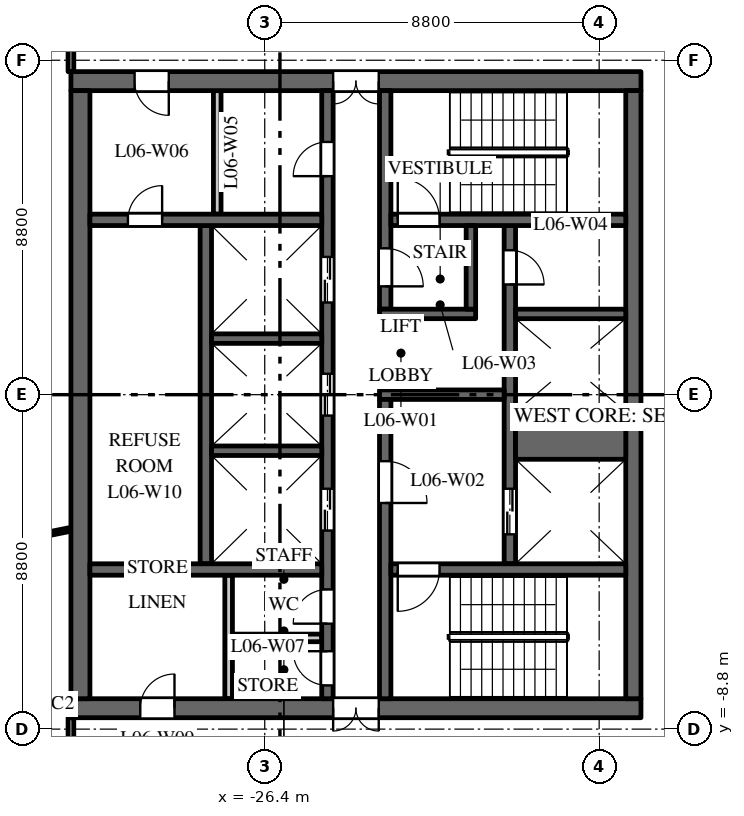
"""IFC4 building model, lengths in metres.
Left out: names, types, materials, properties, quantities, classifications, styles, units other than length and angle.
Written with IfcOpenShell. Run it as: python <this file> out.ifc"""

import sys

from ifc_helpers import new_model, si_unit, direction, frame, frame_2d, origin, place, context, subcontext, project, spatial, rectangle, extrude, element, fill, save


model = new_model("IFC4")
c1 = context("Model", 3, precision=1e-05, world=origin(), true_north=direction((0.0, 1.0)))
c2 = subcontext(c1, "Body", "Model", "MODEL_VIEW")
j1 = project(units=[si_unit("LENGTHUNIT", "METRE"), si_unit("PLANEANGLEUNIT", "RADIAN")], contexts=[c1])
p1 = place(None, origin())
s1 = spatial("IfcSite", under=j1, at=p1, CompositionType="ELEMENT")
p2 = place(p1, origin())
s2 = spatial("IfcBuilding", under=s1, at=p2, CompositionType="ELEMENT")
p3 = place(p2, frame((0.0, 0.0, 34.5)))
s3 = spatial("IfcBuildingStorey", under=s2, at=p3, CompositionType="ELEMENT", Elevation=34.5)
p4 = place(p3, frame((-16.5, 8.25, 0.0), z_axis=(0.0, 0.0, 1.0), x_axis=(-1.0, 0.0, 0.0)))
e1 = element("IfcWall", 1, at=p4, inside=s3, PredefinedType="SHEAR", context=c2, shape_type="SweptSolid", body=[
    extrude(rectangle(XDim=15.0, YDim=0.5, at=frame_2d((7.5, 0.0))), origin(), (0.0, 0.0, 1.0), 3.7),
])
p5 = place(p4, frame((6.9, 0.0, 0.0)))
e2 = element("IfcOpeningElement", 2, at=p5, cuts=e1, PredefinedType="OPENING", context=c2, shape_type="SweptSolid", body=[
    extrude(rectangle(XDim=1.2, YDim=2.1, at=frame_2d((0.6, 1.05))), frame((0.0, 0.26, 0.0), z_axis=(0.0, -1.0, 0.0), x_axis=(1.0, 0.0, 0.0)), (0.0, 0.0, 1.0), 0.52),
])
p6 = place(p4, frame((12.425, 0.0, 0.0)))
e3 = element("IfcOpeningElement", 3, at=p6, cuts=e1, PredefinedType="OPENING", context=c2, shape_type="SweptSolid", body=[
    extrude(rectangle(XDim=0.9, YDim=2.1, at=frame_2d((0.45, 1.05))), frame((0.0, 0.26, 0.0), z_axis=(0.0, -1.0, 0.0), x_axis=(1.0, 0.0, 0.0)), (0.0, 0.0, 1.0), 0.52),
])
p7 = place(p3, frame((-16.5, -8.25, 0.0), z_axis=(0.0, 0.0, 1.0), x_axis=(-1.0, 0.0, 0.0)))
e4 = element("IfcWall", 4, at=p7, inside=s3, PredefinedType="SHEAR", context=c2, shape_type="SweptSolid", body=[
    extrude(rectangle(XDim=15.0, YDim=0.5, at=frame_2d((7.5, 0.0))), origin(), (0.0, 0.0, 1.0), 3.7),
])
p8 = place(p7, frame((6.9, 0.0, 0.0)))
e5 = element("IfcOpeningElement", 5, at=p8, cuts=e4, PredefinedType="OPENING", context=c2, shape_type="SweptSolid", body=[
    extrude(rectangle(XDim=1.2, YDim=2.1, at=frame_2d((0.6, 1.05))), frame((0.0, 0.26, 0.0), z_axis=(0.0, -1.0, 0.0), x_axis=(1.0, 0.0, 0.0)), (0.0, 0.0, 1.0), 0.52),
])
p9 = place(p7, frame((12.275, 0.0, 0.0)))
e6 = element("IfcOpeningElement", 6, at=p9, cuts=e4, PredefinedType="OPENING", context=c2, shape_type="SweptSolid", body=[
    extrude(rectangle(XDim=0.9, YDim=2.1, at=frame_2d((0.45, 1.05))), frame((0.0, 0.26, 0.0), z_axis=(0.0, -1.0, 0.0), x_axis=(1.0, 0.0, 0.0)), (0.0, 0.0, 1.0), 0.52),
])
p10 = place(p3, frame((-27.95, -4.45, 0.0), z_axis=(0.0, 0.0, 1.0), x_axis=(0.0, 1.0, 0.0)))
e7 = element("IfcWall", 7, at=p10, inside=s3, PredefinedType="SHEAR", context=c2, shape_type="SweptSolid", body=[
    extrude(rectangle(XDim=8.9, YDim=0.3, at=frame_2d((4.45, 0.0))), origin(), (0.0, 0.0, 1.0), 3.7),
])
p11 = place(p3, frame((-19.95, -4.45, 0.0), z_axis=(0.0, 0.0, 1.0), x_axis=(0.0, 1.0, 0.0)))
e8 = element("IfcWall", 8, at=p11, inside=s3, PredefinedType="SHEAR", context=c2, shape_type="SweptSolid", body=[
    extrude(rectangle(XDim=8.9, YDim=0.3, at=frame_2d((4.45, 0.0))), origin(), (0.0, 0.0, 1.0), 3.7),
])
p12 = place(p11, frame((0.775, 0.0, 0.0)))
e9 = element("IfcOpeningElement", 9, at=p12, cuts=e8, PredefinedType="OPENING", context=c2, shape_type="SweptSolid", body=[
    extrude(rectangle(XDim=1.2, YDim=2.1, at=frame_2d((0.6, 1.05))), frame((0.0, 0.16, 0.0), z_axis=(0.0, -1.0, 0.0), x_axis=(1.0, 0.0, 0.0)), (0.0, 0.0, 1.0), 0.32),
])
p13 = place(p11, frame((7.35, 0.0, 0.0)))
e10 = element("IfcOpeningElement", 10, at=p13, cuts=e8, PredefinedType="OPENING", context=c2, shape_type="SweptSolid", body=[
    extrude(rectangle(XDim=0.9, YDim=2.1, at=frame_2d((0.45, 1.05))), frame((0.0, 0.16, 0.0), z_axis=(0.0, -1.0, 0.0), x_axis=(1.0, 0.0, 0.0)), (0.0, 0.0, 1.0), 0.32),
])
p14 = place(p3, frame((-24.75, -8.0, 0.0), z_axis=(0.0, 0.0, 1.0), x_axis=(0.0, 1.0, 0.0)))
e11 = element("IfcWall", 11, at=p14, inside=s3, PredefinedType="SHEAR", context=c2, shape_type="SweptSolid", body=[
    extrude(rectangle(XDim=16.0, YDim=0.3, at=frame_2d((8.0, 0.0))), origin(), (0.0, 0.0, 1.0), 3.7),
])
p15 = place(p14, frame((4.425, 0.0, 0.0)))
e12 = element("IfcOpeningElement", 12, at=p15, cuts=e11, PredefinedType="OPENING", context=c2, shape_type="SweptSolid", body=[
    extrude(rectangle(XDim=1.1, YDim=2.1, at=frame_2d((0.55, 1.05))), frame((0.0, 0.16, 0.0), z_axis=(0.0, -1.0, 0.0), x_axis=(1.0, 0.0, 0.0)), (0.0, 0.0, 1.0), 0.32),
])
p16 = place(p14, frame((7.45, 0.0, 0.0)))
e13 = element("IfcOpeningElement", 13, at=p16, cuts=e11, PredefinedType="OPENING", context=c2, shape_type="SweptSolid", body=[
    extrude(rectangle(XDim=1.1, YDim=2.1, at=frame_2d((0.55, 1.05))), frame((0.0, 0.16, 0.0), z_axis=(0.0, -1.0, 0.0), x_axis=(1.0, 0.0, 0.0)), (0.0, 0.0, 1.0), 0.32),
])
p17 = place(p14, frame((10.425, 0.0, 0.0)))
e14 = element("IfcOpeningElement", 14, at=p17, cuts=e11, PredefinedType="OPENING", context=c2, shape_type="SweptSolid", body=[
    extrude(rectangle(XDim=1.2, YDim=2.1, at=frame_2d((0.6, 1.05))), frame((0.0, 0.16, 0.0), z_axis=(0.0, -1.0, 0.0), x_axis=(1.0, 0.0, 0.0)), (0.0, 0.0, 1.0), 0.32),
])
p18 = place(p14, frame((13.75, 0.0, 0.0)))
e15 = element("IfcOpeningElement", 15, at=p18, cuts=e11, PredefinedType="OPENING", context=c2, shape_type="SweptSolid", body=[
    extrude(rectangle(XDim=0.9, YDim=2.1, at=frame_2d((0.45, 1.05))), frame((0.0, 0.16, 0.0), z_axis=(0.0, -1.0, 0.0), x_axis=(1.0, 0.0, 0.0)), (0.0, 0.0, 1.0), 0.32),
])
p19 = place(p14, frame((1.975, 0.0, 0.0)))
e16 = element("IfcOpeningElement", 16, at=p19, cuts=e11, PredefinedType="OPENING", context=c2, shape_type="SweptSolid", body=[
    extrude(rectangle(XDim=0.9, YDim=2.1, at=frame_2d((0.45, 1.05))), frame((0.0, 0.16, 0.0), z_axis=(0.0, -1.0, 0.0), x_axis=(1.0, 0.0, 0.0)), (0.0, 0.0, 1.0), 0.32),
])
p20 = place(p14, frame((0.35, 0.0, 0.0)))
e17 = element("IfcOpeningElement", 17, at=p20, cuts=e11, PredefinedType="OPENING", context=c2, shape_type="SweptSolid", body=[
    extrude(rectangle(XDim=0.9, YDim=2.1, at=frame_2d((0.45, 1.05))), frame((0.0, 0.16, 0.0), z_axis=(0.0, -1.0, 0.0), x_axis=(1.0, 0.0, 0.0)), (0.0, 0.0, 1.0), 0.32),
])
p21 = place(p3, frame((-20.1, 0.0, 0.0), z_axis=(0.0, 0.0, 1.0), x_axis=(-1.0, 0.0, 0.0)))
e18 = element("IfcWall", 18, at=p21, inside=s3, PredefinedType="SHEAR", context=c2, shape_type="SweptSolid", body=[
    extrude(rectangle(XDim=3.28, YDim=0.25, at=frame_2d((1.64, 0.0))), origin(), (0.0, 0.0, 1.0), 3.7),
])
p22 = place(p3, frame((-16.7, -8.0, 0.0), z_axis=(0.0, 0.0, 1.0), x_axis=(0.0, 1.0, 0.0)))
e19 = element("IfcWall", 19, at=p22, inside=s3, PredefinedType="SHEAR", context=c2, shape_type="SweptSolid", body=[
    extrude(rectangle(XDim=16.0, YDim=0.4, at=frame_2d((8.0, 0.0))), origin(), (0.0, 0.0, 1.0), 3.7),
])
p23 = place(p3, frame((-31.25, -8.0, 0.0), z_axis=(0.0, 0.0, 1.0), x_axis=(0.0, 1.0, 0.0)))
e20 = element("IfcWall", 20, at=p23, inside=s3, PredefinedType="SHEAR", context=c2, shape_type="SweptSolid", body=[
    extrude(rectangle(XDim=16.0, YDim=0.5, at=frame_2d((8.0, 0.0))), origin(), (0.0, 0.0, 1.0), 3.7),
])
p24 = place(p3, frame((-24.9, 4.6, 0.0), z_axis=(0.0, 0.0, 1.0), x_axis=(-1.0, 0.0, 0.0)))
e21 = element("IfcWall", 21, at=p24, inside=s3, PredefinedType="SHEAR", context=c2, shape_type="SweptSolid", body=[
    extrude(rectangle(XDim=6.1, YDim=0.3, at=frame_2d((3.05, 0.0))), origin(), (0.0, 0.0, 1.0), 3.7),
])
p25 = place(p24, frame((4.2, 0.0, 0.0)))
e22 = element("IfcOpeningElement", 22, at=p25, cuts=e21, PredefinedType="OPENING", context=c2, shape_type="SweptSolid", body=[
    extrude(rectangle(XDim=0.9, YDim=2.1, at=frame_2d((0.45, 1.05))), frame((0.0, 0.16, 0.0), z_axis=(0.0, -1.0, 0.0), x_axis=(1.0, 0.0, 0.0)), (0.0, 0.0, 1.0), 0.32),
])
for number, where, z_axis, x_axis in (
    (23, (-27.65, 4.75, 0.0), (0.0, 0.0, 1.0), (0.0, 1.0, 0.0)),
    (24, (-27.35, -8.0, 0.0), (0.0, 0.0, 1.0), (0.0, 1.0, 0.0)),
):
    element("IfcWall", number, at=place(p3, frame(where, z_axis=z_axis, x_axis=x_axis)), inside=s3, PredefinedType="PARTITIONING", context=c2, shape_type="SweptSolid", body=[
        extrude(rectangle(XDim=3.25, YDim=0.2, at=frame_2d((1.625, 0.0))), origin(), (0.0, 0.0, 1.0), 3.7),
    ])
p26 = place(p3, frame((-24.9, -6.4, 0.0), z_axis=(0.0, 0.0, 1.0), x_axis=(-1.0, 0.0, 0.0)))
e25 = element("IfcWall", 25, at=p26, inside=s3, PredefinedType="PARTITIONING", context=c2, shape_type="SweptSolid", body=[
    extrude(rectangle(XDim=2.35, YDim=0.2, at=frame_2d((1.175, 0.0))), origin(), (0.0, 0.0, 1.0), 3.7),
])
p27 = place(p3, frame((-24.9, -4.6, 0.0), z_axis=(0.0, 0.0, 1.0), x_axis=(-1.0, 0.0, 0.0)))
e26 = element("IfcWall", 26, at=p27, inside=s3, PredefinedType="SHEAR", context=c2, shape_type="SweptSolid", body=[
    extrude(rectangle(XDim=6.1, YDim=0.3, at=frame_2d((3.05, 0.0))), origin(), (0.0, 0.0, 1.0), 3.7),
])
p28 = place(p3, frame((-16.9, -1.075, 0.0), z_axis=(0.0, 0.0, 1.0), x_axis=(-1.0, 0.0, 0.0)))
e27 = element("IfcWall", 27, at=p28, inside=s3, PredefinedType="SHEAR", context=c2, shape_type="SweptSolid", body=[
    extrude(rectangle(XDim=2.9, YDim=1.25, at=frame_2d((1.45, 0.0))), origin(), (0.0, 0.0, 1.0), 3.7),
])
for number, where, z_axis, x_axis in (
    (28, (-16.9, 2.125, 0.0), (0.0, 0.0, 1.0), (-1.0, 0.0, 0.0)),
    (29, (-24.9, -1.475, 0.0), (0.0, 0.0, 1.0), (-1.0, 0.0, 0.0)),
    (30, (-24.9, 1.475, 0.0), (0.0, 0.0, 1.0), (-1.0, 0.0, 0.0)),
):
    element("IfcWall", number, at=place(p3, frame(where, z_axis=z_axis, x_axis=x_axis)), inside=s3, PredefinedType="SHEAR", context=c2, shape_type="SweptSolid", body=[
        extrude(rectangle(XDim=2.9, YDim=0.25, at=frame_2d((1.45, 0.0))), origin(), (0.0, 0.0, 1.0), 3.7),
    ])
p29 = place(p3, frame((-23.23, 2.25, 0.0), z_axis=(0.0, 0.0, 1.0), x_axis=(0.0, 1.0, 0.0)))
e31 = element("IfcWall", 31, at=p29, inside=s3, PredefinedType="SHEAR", context=c2, shape_type="SweptSolid", body=[
    extrude(rectangle(XDim=5.75, YDim=0.3, at=frame_2d((2.875, 0.0))), origin(), (0.0, 0.0, 1.0), 3.7),
])
p30 = place(p29, frame((0.6, 0.0, 0.0)))
e32 = element("IfcOpeningElement", 32, at=p30, cuts=e31, PredefinedType="OPENING", context=c2, shape_type="SweptSolid", body=[
    extrude(rectangle(XDim=1.0, YDim=2.1, at=frame_2d((0.5, 1.05))), frame((0.0, 0.16, 0.0), z_axis=(0.0, -1.0, 0.0), x_axis=(1.0, 0.0, 0.0)), (0.0, 0.0, 1.0), 0.32),
])
p31 = place(p3, frame((-23.23, -8.0, 0.0), z_axis=(0.0, 0.0, 1.0), x_axis=(0.0, 1.0, 0.0)))
e33 = element("IfcWall", 33, at=p31, inside=s3, PredefinedType="SHEAR", context=c2, shape_type="SweptSolid", body=[
    extrude(rectangle(XDim=7.875, YDim=0.3, at=frame_2d((3.938, 0.0))), origin(), (0.0, 0.0, 1.0), 3.7),
])
p32 = place(p31, frame((5.15, 0.0, 0.0)))
e34 = element("IfcOpeningElement", 34, at=p32, cuts=e33, PredefinedType="OPENING", context=c2, shape_type="SweptSolid", body=[
    extrude(rectangle(XDim=1.1, YDim=2.1, at=frame_2d((0.55, 1.05))), frame((0.0, 0.16, 0.0), z_axis=(0.0, -1.0, 0.0), x_axis=(1.0, 0.0, 0.0)), (0.0, 0.0, 1.0), 0.32),
])
p33 = place(p3, frame((-16.9, 4.6, 0.0), z_axis=(0.0, 0.0, 1.0), x_axis=(-1.0, 0.0, 0.0)))
e35 = element("IfcWall", 35, at=p33, inside=s3, PredefinedType="SHEAR", context=c2, shape_type="SweptSolid", body=[
    extrude(rectangle(XDim=6.18, YDim=0.3, at=frame_2d((3.09, 0.0))), origin(), (0.0, 0.0, 1.0), 3.7),
])
p34 = place(p33, frame((4.9, 0.0, 0.0)))
e36 = element("IfcOpeningElement", 36, at=p34, cuts=e35, PredefinedType="OPENING", context=c2, shape_type="SweptSolid", body=[
    extrude(rectangle(XDim=1.1, YDim=2.1, at=frame_2d((0.55, 1.05))), frame((0.0, 0.16, 0.0), z_axis=(0.0, -1.0, 0.0), x_axis=(1.0, 0.0, 0.0)), (0.0, 0.0, 1.0), 0.32),
])
p35 = place(p3, frame((-16.9, -4.6, 0.0), z_axis=(0.0, 0.0, 1.0), x_axis=(-1.0, 0.0, 0.0)))
e37 = element("IfcWall", 37, at=p35, inside=s3, PredefinedType="SHEAR", context=c2, shape_type="SweptSolid", body=[
    extrude(rectangle(XDim=6.18, YDim=0.3, at=frame_2d((3.09, 0.0))), origin(), (0.0, 0.0, 1.0), 3.7),
])
p36 = place(p35, frame((4.9, 0.0, 0.0)))
e38 = element("IfcOpeningElement", 38, at=p36, cuts=e37, PredefinedType="OPENING", context=c2, shape_type="SweptSolid", body=[
    extrude(rectangle(XDim=1.1, YDim=2.1, at=frame_2d((0.55, 1.05))), frame((0.0, 0.16, 0.0), z_axis=(0.0, -1.0, 0.0), x_axis=(1.0, 0.0, 0.0)), (0.0, 0.0, 1.0), 0.32),
])
p37 = place(p3, frame((-20.85, 2.125, 0.0), z_axis=(0.0, 0.0, 1.0), x_axis=(-1.0, 0.0, 0.0)))
e39 = element("IfcWall", 39, at=p37, inside=s3, PredefinedType="SHEAR", context=c2, shape_type="SweptSolid", body=[
    extrude(rectangle(XDim=2.53, YDim=0.25, at=frame_2d((1.265, 0.0))), origin(), (0.0, 0.0, 1.0), 3.7),
])
p38 = place(p3, frame((-20.975, 2.25, 0.0), z_axis=(0.0, 0.0, 1.0), x_axis=(0.0, 1.0, 0.0)))
e40 = element("IfcWall", 40, at=p38, inside=s3, PredefinedType="SHEAR", context=c2, shape_type="SweptSolid", body=[
    extrude(rectangle(XDim=2.2, YDim=0.25, at=frame_2d((1.1, 0.0))), origin(), (0.0, 0.0, 1.0), 3.7),
])
p39 = place(p3, frame((-35.512, -4.349, 0.0), z_axis=(0.0, 0.0, 1.0), x_axis=(0.980357474535, 0.197228857227, 0.0)))
e41 = element("IfcWall", 41, at=p39, inside=s3, PredefinedType="PARTITIONING", context=c2, shape_type="SweptSolid", body=[
    extrude(rectangle(XDim=4.092, YDim=0.1, at=frame_2d((2.046, 0.0))), origin(), (0.0, 0.0, 1.0), 3.2),
])
p40 = place(p3, frame((-31.5, -10.7, 0.0), z_axis=(0.0, 0.0, 1.0), x_axis=(0.0, 1.0, 0.0)))
e42 = element("IfcWall", 42, at=p40, inside=s3, PredefinedType="PARTITIONING", context=c2, shape_type="SweptSolid", body=[
    extrude(rectangle(XDim=2.2, YDim=0.15, at=frame_2d((1.1, 0.0))), origin(), (0.0, 0.0, 1.0), 3.7),
])
p41 = place(p40, frame((0.55, 0.0, 0.0)))
e43 = element("IfcOpeningElement", 43, at=p41, cuts=e42, PredefinedType="OPENING", context=c2, shape_type="SweptSolid", body=[
    extrude(rectangle(XDim=1.0, YDim=2.1, at=frame_2d((0.5, 1.05))), frame((0.0, 0.085, 0.0), z_axis=(0.0, -1.0, 0.0), x_axis=(1.0, 0.0, 0.0)), (0.0, 0.0, 1.0), 0.17),
])
p42 = place(p3, frame((-31.5, 8.5, 0.0), z_axis=(0.0, 0.0, 1.0), x_axis=(0.0, 1.0, 0.0)))
e44 = element("IfcWall", 44, at=p42, inside=s3, PredefinedType="PARTITIONING", context=c2, shape_type="SweptSolid", body=[
    extrude(rectangle(XDim=2.2, YDim=0.15, at=frame_2d((1.1, 0.0))), origin(), (0.0, 0.0, 1.0), 3.7),
])
p43 = place(p42, frame((0.55, 0.0, 0.0)))
e45 = element("IfcOpeningElement", 45, at=p43, cuts=e44, PredefinedType="OPENING", context=c2, shape_type="SweptSolid", body=[
    extrude(rectangle(XDim=1.0, YDim=2.1, at=frame_2d((0.5, 1.05))), frame((0.0, 0.085, 0.0), z_axis=(0.0, -1.0, 0.0), x_axis=(1.0, 0.0, 0.0)), (0.0, 0.0, 1.0), 0.17),
])
p44 = place(p12, origin())
e46 = element("IfcDoor", 46, at=p44, inside=s3, OperationType="DOUBLE_DOOR_SLIDING", PredefinedType="DOOR", context=c2, shape_type="SweptSolid", body=[
    extrude(rectangle(XDim=1.2, YDim=2.1, at=frame_2d((0.6, 1.05))), frame((0.0, 0.025, 0.0), z_axis=(0.0, -1.0, 0.0), x_axis=(1.0, 0.0, 0.0)), (0.0, 0.0, 1.0), 0.05),
])
fill(e9, e46)
p45 = place(p15, origin())
e47 = element("IfcDoor", 47, at=p45, inside=s3, OperationType="DOUBLE_DOOR_SLIDING", PredefinedType="DOOR", context=c2, shape_type="SweptSolid", body=[
    extrude(rectangle(XDim=1.1, YDim=2.1, at=frame_2d((0.55, 1.05))), frame((0.0, 0.025, 0.0), z_axis=(0.0, -1.0, 0.0), x_axis=(1.0, 0.0, 0.0)), (0.0, 0.0, 1.0), 0.05),
])
fill(e12, e47)
p46 = place(p16, origin())
e48 = element("IfcDoor", 48, at=p46, inside=s3, OperationType="DOUBLE_DOOR_SLIDING", PredefinedType="DOOR", context=c2, shape_type="SweptSolid", body=[
    extrude(rectangle(XDim=1.1, YDim=2.1, at=frame_2d((0.55, 1.05))), frame((0.0, 0.025, 0.0), z_axis=(0.0, -1.0, 0.0), x_axis=(1.0, 0.0, 0.0)), (0.0, 0.0, 1.0), 0.05),
])
fill(e13, e48)
p47 = place(p17, origin())
e49 = element("IfcDoor", 49, at=p47, inside=s3, OperationType="DOUBLE_DOOR_SLIDING", PredefinedType="DOOR", context=c2, shape_type="SweptSolid", body=[
    extrude(rectangle(XDim=1.2, YDim=2.1, at=frame_2d((0.6, 1.05))), frame((0.0, 0.025, 0.0), z_axis=(0.0, -1.0, 0.0), x_axis=(1.0, 0.0, 0.0)), (0.0, 0.0, 1.0), 0.05),
])
fill(e14, e49)
p48 = place(p34, origin())
e50 = element("IfcDoor", 50, at=p48, inside=s3, OperationType="SINGLE_SWING_RIGHT", PredefinedType="DOOR", context=c2, shape_type="SweptSolid", body=[
    extrude(rectangle(XDim=1.1, YDim=2.1, at=frame_2d((0.55, 1.05))), frame((0.0, 0.025, 0.0), z_axis=(0.0, -1.0, 0.0), x_axis=(1.0, 0.0, 0.0)), (0.0, 0.0, 1.0), 0.05),
])
fill(e36, e50)
p49 = place(p36, origin())
e51 = element("IfcDoor", 51, at=p49, inside=s3, OperationType="SINGLE_SWING_LEFT", PredefinedType="DOOR", context=c2, shape_type="SweptSolid", body=[
    extrude(rectangle(XDim=1.1, YDim=2.1, at=frame_2d((0.55, 1.05))), frame((0.0, 0.025, 0.0), z_axis=(0.0, -1.0, 0.0), x_axis=(1.0, 0.0, 0.0)), (0.0, 0.0, 1.0), 0.05),
])
fill(e38, e51)
p50 = place(p32, origin())
e52 = element("IfcDoor", 52, at=p50, inside=s3, OperationType="SINGLE_SWING_LEFT", PredefinedType="DOOR", context=c2, shape_type="SweptSolid", body=[
    extrude(rectangle(XDim=1.1, YDim=2.1, at=frame_2d((0.55, 1.05))), frame((0.0, 0.025, 0.0), z_axis=(0.0, -1.0, 0.0), x_axis=(1.0, 0.0, 0.0)), (0.0, 0.0, 1.0), 0.05),
])
fill(e34, e52)
p51 = place(p30, origin())
e53 = element("IfcDoor", 53, at=p51, inside=s3, OperationType="SINGLE_SWING_LEFT", PredefinedType="DOOR", context=c2, shape_type="SweptSolid", body=[
    extrude(rectangle(XDim=1.0, YDim=2.1, at=frame_2d((0.5, 1.05))), frame((0.0, 0.025, 0.0), z_axis=(0.0, -1.0, 0.0), x_axis=(1.0, 0.0, 0.0)), (0.0, 0.0, 1.0), 0.05),
])
fill(e32, e53)
p52 = place(p5, origin())
e54 = element("IfcDoor", 54, at=p52, inside=s3, OperationType="DOUBLE_DOOR_DOUBLE_SWING", PredefinedType="DOOR", context=c2, shape_type="SweptSolid", body=[
    extrude(rectangle(XDim=1.2, YDim=2.1, at=frame_2d((0.6, 1.05))), frame((0.0, 0.025, 0.0), z_axis=(0.0, -1.0, 0.0), x_axis=(1.0, 0.0, 0.0)), (0.0, 0.0, 1.0), 0.05),
])
fill(e2, e54)
p53 = place(p8, origin())
e55 = element("IfcDoor", 55, at=p53, inside=s3, OperationType="DOUBLE_DOOR_DOUBLE_SWING", PredefinedType="DOOR", context=c2, shape_type="SweptSolid", body=[
    extrude(rectangle(XDim=1.2, YDim=2.1, at=frame_2d((0.6, 1.05))), frame((0.0, 0.025, 0.0), z_axis=(0.0, -1.0, 0.0), x_axis=(1.0, 0.0, 0.0)), (0.0, 0.0, 1.0), 0.05),
])
fill(e5, e55)
p54 = place(p13, origin())
e56 = element("IfcDoor", 56, at=p54, inside=s3, OperationType="SINGLE_SWING_LEFT", PredefinedType="DOOR", context=c2, shape_type="SweptSolid", body=[
    extrude(rectangle(XDim=0.9, YDim=2.1, at=frame_2d((0.45, 1.05))), frame((0.0, 0.025, 0.0), z_axis=(0.0, -1.0, 0.0), x_axis=(1.0, 0.0, 0.0)), (0.0, 0.0, 1.0), 0.05),
])
fill(e10, e56)
p55 = place(p18, origin())
e57 = element("IfcDoor", 57, at=p55, inside=s3, OperationType="SINGLE_SWING_RIGHT", PredefinedType="DOOR", context=c2, shape_type="SweptSolid", body=[
    extrude(rectangle(XDim=0.9, YDim=2.1, at=frame_2d((0.45, 1.05))), frame((0.0, 0.025, 0.0), z_axis=(0.0, -1.0, 0.0), x_axis=(1.0, 0.0, 0.0)), (0.0, 0.0, 1.0), 0.05),
])
fill(e15, e57)
p56 = place(p6, origin())
e58 = element("IfcDoor", 58, at=p56, inside=s3, OperationType="SINGLE_SWING_RIGHT", PredefinedType="DOOR", context=c2, shape_type="SweptSolid", body=[
    extrude(rectangle(XDim=0.9, YDim=2.1, at=frame_2d((0.45, 1.05))), frame((0.0, 0.025, 0.0), z_axis=(0.0, -1.0, 0.0), x_axis=(1.0, 0.0, 0.0)), (0.0, 0.0, 1.0), 0.05),
])
fill(e3, e58)
p57 = place(p19, origin())
e59 = element("IfcDoor", 59, at=p57, inside=s3, OperationType="SINGLE_SWING_RIGHT", PredefinedType="DOOR", context=c2, shape_type="SweptSolid", body=[
    extrude(rectangle(XDim=0.9, YDim=2.1, at=frame_2d((0.45, 1.05))), frame((0.0, 0.025, 0.0), z_axis=(0.0, -1.0, 0.0), x_axis=(1.0, 0.0, 0.0)), (0.0, 0.0, 1.0), 0.05),
])
fill(e16, e59)
p58 = place(p20, origin())
e60 = element("IfcDoor", 60, at=p58, inside=s3, OperationType="SINGLE_SWING_LEFT", PredefinedType="DOOR", context=c2, shape_type="SweptSolid", body=[
    extrude(rectangle(XDim=0.9, YDim=2.1, at=frame_2d((0.45, 1.05))), frame((0.0, 0.025, 0.0), z_axis=(0.0, -1.0, 0.0), x_axis=(1.0, 0.0, 0.0)), (0.0, 0.0, 1.0), 0.05),
])
fill(e17, e60)
p59 = place(p9, origin())
e61 = element("IfcDoor", 61, at=p59, inside=s3, OperationType="SINGLE_SWING_LEFT", PredefinedType="DOOR", context=c2, shape_type="SweptSolid", body=[
    extrude(rectangle(XDim=0.9, YDim=2.1, at=frame_2d((0.45, 1.05))), frame((0.0, 0.025, 0.0), z_axis=(0.0, -1.0, 0.0), x_axis=(1.0, 0.0, 0.0)), (0.0, 0.0, 1.0), 0.05),
])
fill(e6, e61)
p60 = place(p25, origin())
e62 = element("IfcDoor", 62, at=p60, inside=s3, OperationType="SINGLE_SWING_LEFT", PredefinedType="DOOR", context=c2, shape_type="SweptSolid", body=[
    extrude(rectangle(XDim=0.9, YDim=2.1, at=frame_2d((0.45, 1.05))), frame((0.0, 0.025, 0.0), z_axis=(0.0, -1.0, 0.0), x_axis=(1.0, 0.0, 0.0)), (0.0, 0.0, 1.0), 0.05),
])
fill(e22, e62)
save(model, sys.argv[1])
